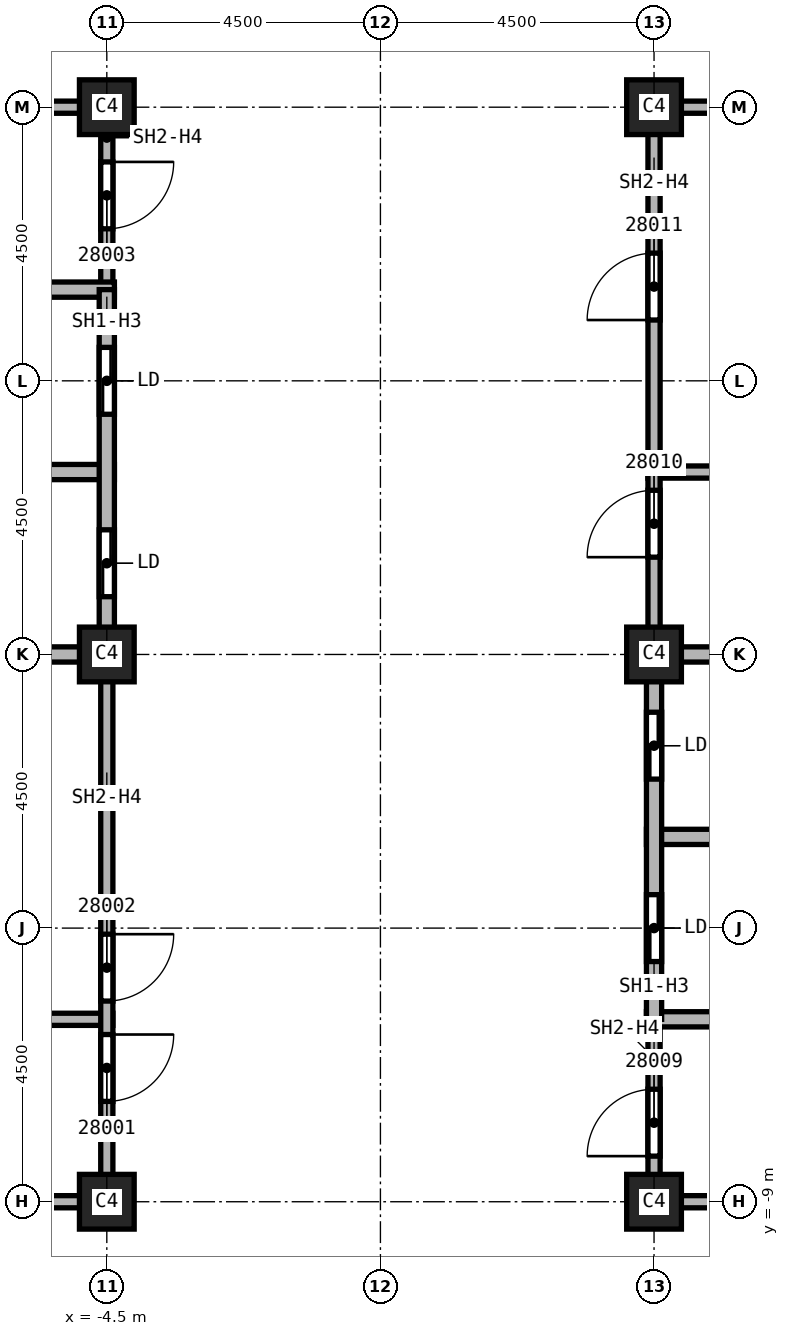
"""IFC4 building model, lengths in metres.
Left out: names, types, materials, properties, quantities, classifications, styles, units other than length and angle.
Written with IfcOpenShell. Run it as: python <this file> out.ifc"""

import sys

from ifc_helpers import new_model, si_unit, direction, frame, frame_2d, origin, origin_2d, place, context, subcontext, project, spatial, rectangle, extrude, element, fill, save


model = new_model("IFC4")
c1 = context("Model", 3, precision=1e-05, world=origin(), true_north=direction((0.0, 1.0)))
c2 = subcontext(c1, "Body", "Model", "MODEL_VIEW")
j1 = project(units=[si_unit("LENGTHUNIT", "METRE"), si_unit("PLANEANGLEUNIT", "RADIAN")], contexts=[c1])
p1 = place(None, origin())
s1 = spatial("IfcSite", under=j1, at=p1, CompositionType="ELEMENT")
p2 = place(p1, origin())
s2 = spatial("IfcBuilding", under=s1, at=p2, CompositionType="ELEMENT")
p3 = place(p2, frame((0.0, 0.0, 236.0)))
s3 = spatial("IfcBuildingStorey", under=s2, at=p3, CompositionType="ELEMENT", Elevation=236.0)
for number, where, z_axis, x_axis in (
    (1, (4.5, 0.0, 0.0), (0.0, 0.0, 1.0), (1.0, 0.0, 0.0)),
    (2, (4.5, 9.0, 0.0), (0.0, 0.0, 1.0), (1.0, 0.0, 0.0)),
    (3, (4.5, -9.0, 0.0), (0.0, 0.0, 1.0), (1.0, 0.0, 0.0)),
    (4, (-4.5, 0.0, 0.0), (0.0, 0.0, 1.0), (1.0, 0.0, 0.0)),
    (5, (-4.5, 9.0, 0.0), (0.0, 0.0, 1.0), (1.0, 0.0, 0.0)),
    (6, (-4.5, -9.0, 0.0), (0.0, 0.0, 1.0), (1.0, 0.0, 0.0)),
):
    element("IfcColumn", number, at=place(p3, frame(where, z_axis=z_axis, x_axis=x_axis)), inside=s3, PredefinedType="COLUMN", context=c2, shape_type="SweptSolid", body=[
        extrude(rectangle(XDim=0.9, YDim=0.9, at=origin_2d()), origin(), (0.0, 0.0, 1.0), 5.72),
    ])
p4 = place(p3, frame((-7.6, -6.0, 0.0), z_axis=(0.0, 0.0, 1.0), x_axis=(1.0, 0.0, 0.0)))
e7 = element("IfcWall", 7, at=p4, inside=s3, PredefinedType="SOLIDWALL", context=c2, shape_type="SweptSolid", body=[
    extrude(rectangle(XDim=3.2, YDim=0.2, at=frame_2d((1.6, 0.0))), origin(), (0.0, 0.0, 1.0), 5.72),
])
for number, where, z_axis, x_axis in (
    (8, (-7.5, 9.0, 0.0), (0.0, 0.0, 1.0), (1.0, 0.0, 0.0)),
    (9, (-4.5, -9.0, 0.0), (0.0, 0.0, 1.0), (-1.0, 0.0, 0.0)),
):
    element("IfcWall", number, at=place(p3, frame(where, z_axis=z_axis, x_axis=x_axis)), inside=s3, PredefinedType="SOLIDWALL", context=c2, shape_type="SweptSolid", body=[
        extrude(rectangle(XDim=3.0, YDim=0.2, at=frame_2d((1.5, 0.0))), origin(), (0.0, 0.0, 1.0), 5.042),
    ])
p5 = place(p3, frame((-4.5, 0.0, 0.0), z_axis=(0.0, 0.0, 1.0), x_axis=(0.0, -1.0, 0.0)))
e10 = element("IfcWall", 10, at=p5, inside=s3, PredefinedType="SOLIDWALL", context=c2, shape_type="SweptSolid", body=[
    extrude(rectangle(XDim=9.1, YDim=0.2, at=frame_2d((4.55, 0.0))), origin(), (0.0, 0.0, 1.0), 5.042),
])
p6 = place(p5, frame((6.25, 0.0, 0.0)))
e11 = element("IfcOpeningElement", 11, at=p6, cuts=e10, PredefinedType="OPENING", context=c2, shape_type="SweptSolid", body=[
    extrude(rectangle(XDim=1.1, YDim=2.1, at=frame_2d((0.55, 1.05))), frame((0.0, 0.1, 0.0), z_axis=(0.0, -1.0, 0.0), x_axis=(1.0, 0.0, 0.0)), (0.0, 0.0, 1.0), 0.2),
])
p7 = place(p5, frame((4.6, 0.0, 0.0)))
e12 = element("IfcOpeningElement", 12, at=p7, cuts=e10, PredefinedType="OPENING", context=c2, shape_type="SweptSolid", body=[
    extrude(rectangle(XDim=1.1, YDim=2.1, at=frame_2d((0.55, 1.05))), frame((0.0, 0.1, 0.0), z_axis=(0.0, -1.0, 0.0), x_axis=(1.0, 0.0, 0.0)), (0.0, 0.0, 1.0), 0.2),
])
p8 = place(p3, frame((-4.5, 9.1, 0.0), z_axis=(0.0, 0.0, 1.0), x_axis=(0.0, -1.0, 0.0)))
e13 = element("IfcWall", 13, at=p8, inside=s3, PredefinedType="SOLIDWALL", context=c2, shape_type="SweptSolid", body=[
    extrude(rectangle(XDim=3.1, YDim=0.2, at=frame_2d((1.55, 0.0))), origin(), (0.0, 0.0, 1.0), 5.042),
])
p9 = place(p8, frame((1.0, 0.0, 0.0)))
e14 = element("IfcOpeningElement", 14, at=p9, cuts=e13, PredefinedType="OPENING", context=c2, shape_type="SweptSolid", body=[
    extrude(rectangle(XDim=1.1, YDim=2.1, at=frame_2d((0.55, 1.05))), frame((0.0, 0.1, 0.0), z_axis=(0.0, -1.0, 0.0), x_axis=(1.0, 0.0, 0.0)), (0.0, 0.0, 1.0), 0.2),
])
p10 = place(p3, frame((4.4, 3.0, 0.0), z_axis=(0.0, 0.0, 1.0), x_axis=(1.0, 0.0, 0.0)))
e15 = element("IfcWall", 15, at=p10, inside=s3, PredefinedType="SOLIDWALL", context=c2, shape_type="SweptSolid", body=[
    extrude(rectangle(XDim=3.225, YDim=0.2, at=frame_2d((1.613, 0.0))), origin(), (0.0, 0.0, 1.0), 5.72),
])
p11 = place(p3, frame((4.5, -9.1, 0.0), z_axis=(0.0, 0.0, 1.0), x_axis=(0.0, 1.0, 0.0)))
e16 = element("IfcWall", 16, at=p11, inside=s3, PredefinedType="SOLIDWALL", context=c2, shape_type="SweptSolid", body=[
    extrude(rectangle(XDim=3.1, YDim=0.2, at=frame_2d((1.55, 0.0))), origin(), (0.0, 0.0, 1.0), 5.042),
])
p12 = place(p11, frame((0.85, 0.0, 0.0)))
e17 = element("IfcOpeningElement", 17, at=p12, cuts=e16, PredefinedType="OPENING", context=c2, shape_type="SweptSolid", body=[
    extrude(rectangle(XDim=1.1, YDim=2.1, at=frame_2d((0.55, 1.05))), frame((0.0, 0.1, 0.0), z_axis=(0.0, -1.0, 0.0), x_axis=(1.0, 0.0, 0.0)), (0.0, 0.0, 1.0), 0.2),
])
p13 = place(p3, frame((4.5, 0.0, 0.0), z_axis=(0.0, 0.0, 1.0), x_axis=(0.0, 1.0, 0.0)))
e18 = element("IfcWall", 18, at=p13, inside=s3, PredefinedType="SOLIDWALL", context=c2, shape_type="SweptSolid", body=[
    extrude(rectangle(XDim=9.1, YDim=0.2, at=frame_2d((4.55, 0.0))), origin(), (0.0, 0.0, 1.0), 5.042),
])
p14 = place(p13, frame((1.6, 0.0, 0.0)))
e19 = element("IfcOpeningElement", 19, at=p14, cuts=e18, PredefinedType="OPENING", context=c2, shape_type="SweptSolid", body=[
    extrude(rectangle(XDim=1.1, YDim=2.1, at=frame_2d((0.55, 1.05))), frame((0.0, 0.1, 0.0), z_axis=(0.0, -1.0, 0.0), x_axis=(1.0, 0.0, 0.0)), (0.0, 0.0, 1.0), 0.2),
])
p15 = place(p13, frame((5.5, 0.0, 0.0)))
e20 = element("IfcOpeningElement", 20, at=p15, cuts=e18, PredefinedType="OPENING", context=c2, shape_type="SweptSolid", body=[
    extrude(rectangle(XDim=1.1, YDim=2.1, at=frame_2d((0.55, 1.05))), frame((0.0, 0.1, 0.0), z_axis=(0.0, -1.0, 0.0), x_axis=(1.0, 0.0, 0.0)), (0.0, 0.0, 1.0), 0.2),
])
for number, where, z_axis, x_axis in (
    (21, (4.5, 9.0, 0.0), (0.0, 0.0, 1.0), (1.0, 0.0, 0.0)),
    (22, (7.5, -9.0, 0.0), (0.0, 0.0, 1.0), (-1.0, 0.0, 0.0)),
):
    element("IfcWall", number, at=place(p3, frame(where, z_axis=z_axis, x_axis=x_axis)), inside=s3, PredefinedType="SOLIDWALL", context=c2, shape_type="SweptSolid", body=[
        extrude(rectangle(XDim=3.0, YDim=0.2, at=frame_2d((1.5, 0.0))), origin(), (0.0, 0.0, 1.0), 5.042),
    ])
p16 = place(p3, frame((-13.625, 3.0, 0.0), z_axis=(0.0, 0.0, 1.0), x_axis=(1.0, 0.0, 0.0)))
e23 = element("IfcWall", 23, at=p16, inside=s3, PredefinedType="SOLIDWALL", context=c2, shape_type="SweptSolid", body=[
    extrude(rectangle(XDim=9.25, YDim=0.25, at=frame_2d((4.625, 0.0))), origin(), (0.0, 0.0, 1.0), 5.72),
])
p17 = place(p16, frame((3.25, 0.0, 0.0)))
e24 = element("IfcOpeningElement", 24, at=p17, cuts=e23, PredefinedType="OPENING", context=c2, shape_type="SweptSolid", body=[
    extrude(rectangle(XDim=1.1, YDim=2.1, at=frame_2d((0.55, 1.05))), frame((0.0, 0.125, 0.0), z_axis=(0.0, -1.0, 0.0), x_axis=(1.0, 0.0, 0.0)), (0.0, 0.0, 1.0), 0.25),
])
for number, where, z_axis, x_axis in (
    (25, (-7.625, 0.0, 0.0), (0.0, 0.0, 1.0), (1.0, 0.0, 0.0)),
    (26, (-7.625, 6.0, 0.0), (0.0, 0.0, 1.0), (1.0, 0.0, 0.0)),
):
    element("IfcWall", number, at=place(p3, frame(where, z_axis=z_axis, x_axis=x_axis)), inside=s3, PredefinedType="SOLIDWALL", context=c2, shape_type="SweptSolid", body=[
        extrude(rectangle(XDim=3.25, YDim=0.25, at=frame_2d((1.625, 0.0))), origin(), (0.0, 0.0, 1.0), 5.72),
    ])
p18 = place(p3, frame((-4.5, 6.0, 0.0), z_axis=(0.0, 0.0, 1.0), x_axis=(0.0, -1.0, 0.0)))
e27 = element("IfcWall", 27, at=p18, inside=s3, PredefinedType="SOLIDWALL", context=c2, shape_type="SweptSolid", body=[
    extrude(rectangle(XDim=6.0, YDim=0.25, at=frame_2d((3.0, 0.0))), origin(), (0.0, 0.0, 1.0), 5.042),
])
p19 = place(p18, frame((3.95, 0.0, 0.0)))
e28 = element("IfcOpeningElement", 28, at=p19, cuts=e27, PredefinedType="OPENING", context=c2, shape_type="SweptSolid", body=[
    extrude(rectangle(XDim=1.1, YDim=2.1, at=frame_2d((0.55, 1.05))), frame((0.0, 0.125, 0.0), z_axis=(0.0, -1.0, 0.0), x_axis=(1.0, 0.0, 0.0)), (0.0, 0.0, 1.0), 0.25),
])
p20 = place(p18, frame((0.95, 0.0, 0.0)))
e29 = element("IfcOpeningElement", 29, at=p20, cuts=e27, PredefinedType="OPENING", context=c2, shape_type="SweptSolid", body=[
    extrude(rectangle(XDim=1.1, YDim=2.1, at=frame_2d((0.55, 1.05))), frame((0.0, 0.125, 0.0), z_axis=(0.0, -1.0, 0.0), x_axis=(1.0, 0.0, 0.0)), (0.0, 0.0, 1.0), 0.25),
])
p21 = place(p3, frame((4.375, -6.0, 0.0), z_axis=(0.0, 0.0, 1.0), x_axis=(1.0, 0.0, 0.0)))
e30 = element("IfcWall", 30, at=p21, inside=s3, PredefinedType="SOLIDWALL", context=c2, shape_type="SweptSolid", body=[
    extrude(rectangle(XDim=3.25, YDim=0.25, at=frame_2d((1.625, 0.0))), origin(), (0.0, 0.0, 1.0), 5.72),
])
p22 = place(p3, frame((4.375, -3.0, 0.0), z_axis=(0.0, 0.0, 1.0), x_axis=(1.0, 0.0, 0.0)))
e31 = element("IfcWall", 31, at=p22, inside=s3, PredefinedType="SOLIDWALL", context=c2, shape_type="SweptSolid", body=[
    extrude(rectangle(XDim=9.25, YDim=0.25, at=frame_2d((4.625, 0.0))), origin(), (0.0, 0.0, 1.0), 5.72),
])
p23 = place(p22, frame((3.375, 0.0, 0.0)))
e32 = element("IfcOpeningElement", 32, at=p23, cuts=e31, PredefinedType="OPENING", context=c2, shape_type="SweptSolid", body=[
    extrude(rectangle(XDim=1.1, YDim=2.1, at=frame_2d((0.55, 1.05))), frame((0.0, 0.125, 0.0), z_axis=(0.0, -1.0, 0.0), x_axis=(1.0, 0.0, 0.0)), (0.0, 0.0, 1.0), 0.25),
])
p24 = place(p3, frame((4.375, 0.0, 0.0), z_axis=(0.0, 0.0, 1.0), x_axis=(1.0, 0.0, 0.0)))
e33 = element("IfcWall", 33, at=p24, inside=s3, PredefinedType="SOLIDWALL", context=c2, shape_type="SweptSolid", body=[
    extrude(rectangle(XDim=3.25, YDim=0.25, at=frame_2d((1.625, 0.0))), origin(), (0.0, 0.0, 1.0), 5.72),
])
p25 = place(p3, frame((4.5, -6.0, 0.0), z_axis=(0.0, 0.0, 1.0), x_axis=(0.0, 1.0, 0.0)))
e34 = element("IfcWall", 34, at=p25, inside=s3, PredefinedType="SOLIDWALL", context=c2, shape_type="SweptSolid", body=[
    extrude(rectangle(XDim=6.0, YDim=0.25, at=frame_2d((3.0, 0.0))), origin(), (0.0, 0.0, 1.0), 5.042),
])
p26 = place(p25, frame((0.95, 0.0, 0.0)))
e35 = element("IfcOpeningElement", 35, at=p26, cuts=e34, PredefinedType="OPENING", context=c2, shape_type="SweptSolid", body=[
    extrude(rectangle(XDim=1.1, YDim=2.1, at=frame_2d((0.55, 1.05))), frame((0.0, 0.125, 0.0), z_axis=(0.0, -1.0, 0.0), x_axis=(1.0, 0.0, 0.0)), (0.0, 0.0, 1.0), 0.25),
])
p27 = place(p25, frame((3.95, 0.0, 0.0)))
e36 = element("IfcOpeningElement", 36, at=p27, cuts=e34, PredefinedType="OPENING", context=c2, shape_type="SweptSolid", body=[
    extrude(rectangle(XDim=1.1, YDim=2.1, at=frame_2d((0.55, 1.05))), frame((0.0, 0.125, 0.0), z_axis=(0.0, -1.0, 0.0), x_axis=(1.0, 0.0, 0.0)), (0.0, 0.0, 1.0), 0.25),
])
p28 = place(p6, origin())
e37 = element("IfcDoor", 37, at=p28, inside=s3, OperationType="SINGLE_SWING_RIGHT", PredefinedType="DOOR", context=c2, shape_type="SweptSolid", body=[
    extrude(rectangle(XDim=1.1, YDim=2.1, at=frame_2d((0.55, 1.05))), frame((0.0, 0.025, 0.0), z_axis=(0.0, -1.0, 0.0), x_axis=(1.0, 0.0, 0.0)), (0.0, 0.0, 1.0), 0.05),
])
fill(e11, e37)
p29 = place(p7, origin())
e38 = element("IfcDoor", 38, at=p29, inside=s3, OperationType="SINGLE_SWING_LEFT", PredefinedType="DOOR", context=c2, shape_type="SweptSolid", body=[
    extrude(rectangle(XDim=1.1, YDim=2.1, at=frame_2d((0.55, 1.05))), frame((0.0, 0.025, 0.0), z_axis=(0.0, -1.0, 0.0), x_axis=(1.0, 0.0, 0.0)), (0.0, 0.0, 1.0), 0.05),
])
fill(e12, e38)
p30 = place(p9, origin())
e39 = element("IfcDoor", 39, at=p30, inside=s3, OperationType="SINGLE_SWING_RIGHT", PredefinedType="DOOR", context=c2, shape_type="SweptSolid", body=[
    extrude(rectangle(XDim=1.1, YDim=2.1, at=frame_2d((0.55, 1.05))), frame((0.0, 0.025, 0.0), z_axis=(0.0, -1.0, 0.0), x_axis=(1.0, 0.0, 0.0)), (0.0, 0.0, 1.0), 0.05),
])
fill(e14, e39)
p31 = place(p12, origin())
e40 = element("IfcDoor", 40, at=p31, inside=s3, OperationType="SINGLE_SWING_RIGHT", PredefinedType="DOOR", context=c2, shape_type="SweptSolid", body=[
    extrude(rectangle(XDim=1.1, YDim=2.1, at=frame_2d((0.55, 1.05))), frame((0.0, 0.025, 0.0), z_axis=(0.0, -1.0, 0.0), x_axis=(1.0, 0.0, 0.0)), (0.0, 0.0, 1.0), 0.05),
])
fill(e17, e40)
p32 = place(p14, origin())
e41 = element("IfcDoor", 41, at=p32, inside=s3, OperationType="SINGLE_SWING_LEFT", PredefinedType="DOOR", context=c2, shape_type="SweptSolid", body=[
    extrude(rectangle(XDim=1.1, YDim=2.1, at=frame_2d((0.55, 1.05))), frame((0.0, 0.025, 0.0), z_axis=(0.0, -1.0, 0.0), x_axis=(1.0, 0.0, 0.0)), (0.0, 0.0, 1.0), 0.05),
])
fill(e19, e41)
p33 = place(p15, origin())
e42 = element("IfcDoor", 42, at=p33, inside=s3, OperationType="SINGLE_SWING_RIGHT", PredefinedType="DOOR", context=c2, shape_type="SweptSolid", body=[
    extrude(rectangle(XDim=1.1, YDim=2.1, at=frame_2d((0.55, 1.05))), frame((0.0, 0.025, 0.0), z_axis=(0.0, -1.0, 0.0), x_axis=(1.0, 0.0, 0.0)), (0.0, 0.0, 1.0), 0.05),
])
fill(e20, e42)
p34 = place(p19, origin())
e43 = element("IfcDoor", 43, at=p34, inside=s3, OperationType="SLIDING_TO_LEFT", PredefinedType="DOOR", context=c2, shape_type="SweptSolid", body=[
    extrude(rectangle(XDim=1.1, YDim=2.1, at=frame_2d((0.55, 1.05))), frame((0.0, 0.025, 0.0), z_axis=(0.0, -1.0, 0.0), x_axis=(1.0, 0.0, 0.0)), (0.0, 0.0, 1.0), 0.05),
])
fill(e28, e43)
p35 = place(p20, origin())
e44 = element("IfcDoor", 44, at=p35, inside=s3, OperationType="SLIDING_TO_LEFT", PredefinedType="DOOR", context=c2, shape_type="SweptSolid", body=[
    extrude(rectangle(XDim=1.1, YDim=2.1, at=frame_2d((0.55, 1.05))), frame((0.0, 0.025, 0.0), z_axis=(0.0, -1.0, 0.0), x_axis=(1.0, 0.0, 0.0)), (0.0, 0.0, 1.0), 0.05),
])
fill(e29, e44)
p36 = place(p26, origin())
e45 = element("IfcDoor", 45, at=p36, inside=s3, OperationType="SLIDING_TO_LEFT", PredefinedType="DOOR", context=c2, shape_type="SweptSolid", body=[
    extrude(rectangle(XDim=1.1, YDim=2.1, at=frame_2d((0.55, 1.05))), frame((0.0, 0.025, 0.0), z_axis=(0.0, -1.0, 0.0), x_axis=(1.0, 0.0, 0.0)), (0.0, 0.0, 1.0), 0.05),
])
fill(e35, e45)
p37 = place(p27, origin())
e46 = element("IfcDoor", 46, at=p37, inside=s3, OperationType="SLIDING_TO_LEFT", PredefinedType="DOOR", context=c2, shape_type="SweptSolid", body=[
    extrude(rectangle(XDim=1.1, YDim=2.1, at=frame_2d((0.55, 1.05))), frame((0.0, 0.025, 0.0), z_axis=(0.0, -1.0, 0.0), x_axis=(1.0, 0.0, 0.0)), (0.0, 0.0, 1.0), 0.05),
])
fill(e36, e46)
save(model, sys.argv[1])
